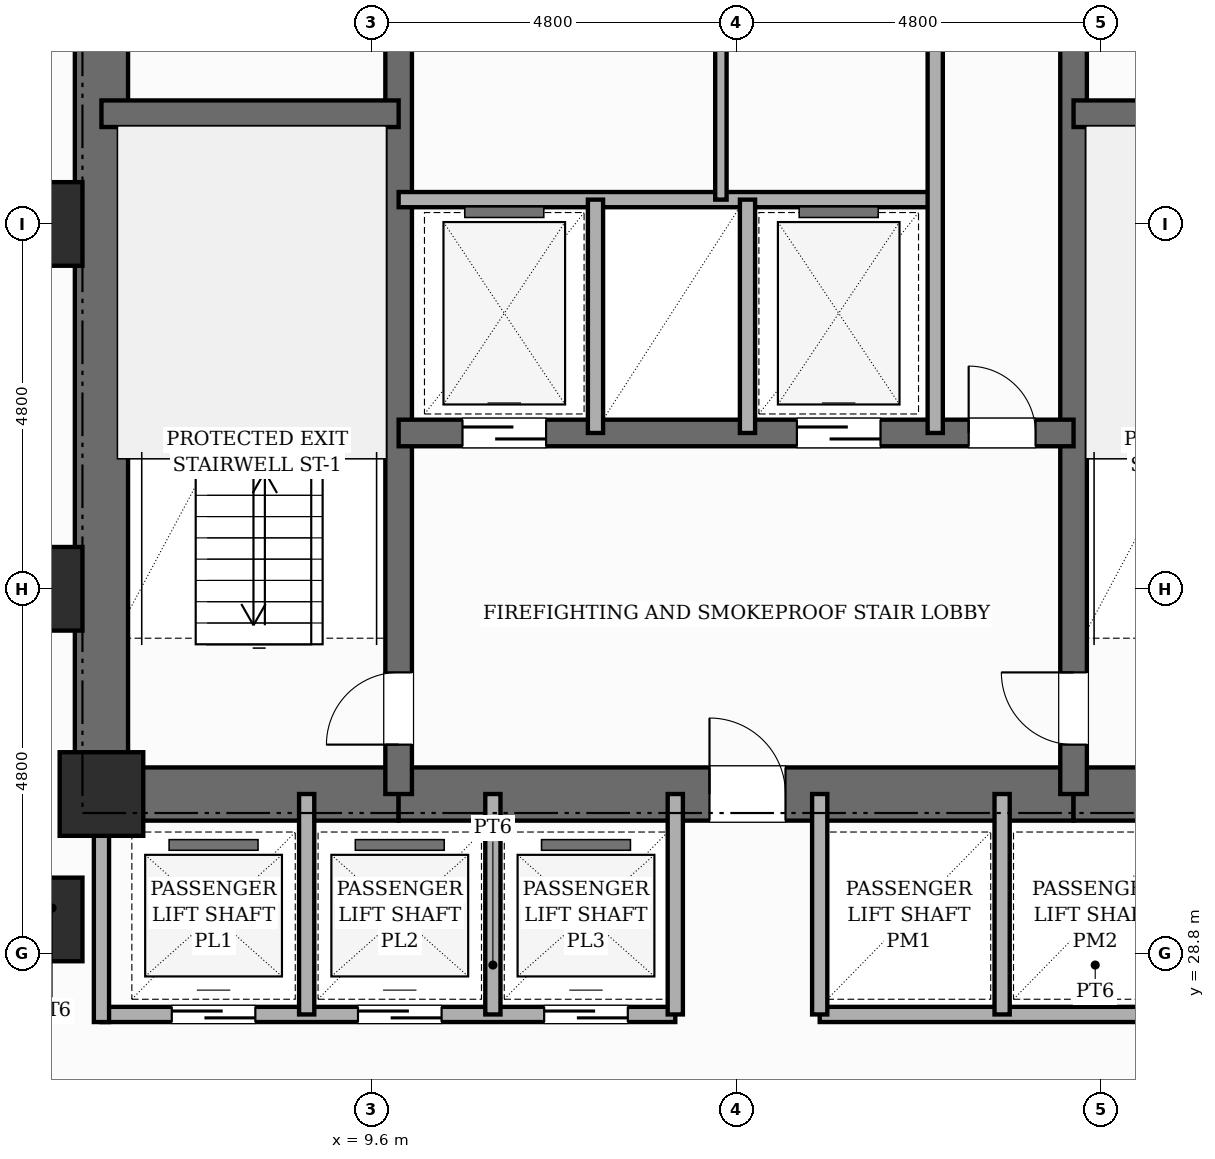
"""IFC4 building model, lengths in metres.
Left out: names, types, materials, properties, quantities, classifications, styles, units other than length and angle.
Written with IfcOpenShell. Run it as: python <this file> out.ifc"""

import sys

from ifc_helpers import new_model, si_unit, direction, frame, frame_2d, origin, origin_2d, place, context, subcontext, project, spatial, rectangle, extrude, element, fill, save


model = new_model("IFC4")
c1 = context("Model", 3, precision=1e-05, world=origin(), true_north=direction((0.0, 1.0)))
c2 = subcontext(c1, "Body", "Model", "MODEL_VIEW")
j1 = project(units=[si_unit("LENGTHUNIT", "METRE"), si_unit("PLANEANGLEUNIT", "RADIAN")], contexts=[c1])
p1 = place(None, origin())
s1 = spatial("IfcSite", under=j1, at=p1, CompositionType="ELEMENT")
p2 = place(p1, origin())
s2 = spatial("IfcBuilding", under=s1, at=p2, CompositionType="ELEMENT")
p3 = place(p2, frame((0.0, 0.0, 35.8)))
s3 = spatial("IfcBuildingStorey", under=s2, at=p3, CompositionType="ELEMENT", Elevation=35.8)
p4 = place(p3, frame((6.05, 30.55, 0.0), z_axis=(0.0, 0.0, 1.0), x_axis=(0.0, 1.0, 0.0)))
e1 = element("IfcWall", 1, at=p4, inside=s3, PredefinedType="SHEAR", context=c2, shape_type="SweptSolid", body=[
    extrude(rectangle(XDim=15.6, YDim=0.7, at=frame_2d((7.8, 0.0))), origin(), (0.0, 0.0, 1.0), 3.6),
])
p5 = place(p3, frame((6.05, 30.9, 0.0), z_axis=(0.0, 0.0, 1.0), x_axis=(1.0, 0.0, 0.0)))
e2 = element("IfcWall", 2, at=p5, inside=s3, PredefinedType="SHEAR", context=c2, shape_type="SweptSolid", body=[
    extrude(rectangle(XDim=3.91, YDim=0.7, at=frame_2d((1.955, 0.0))), origin(), (0.0, 0.0, 1.0), 3.6),
])
p6 = place(p3, frame((9.96, 30.9, 0.0), z_axis=(0.0, 0.0, 1.0), x_axis=(1.0, 0.0, 0.0)))
e3 = element("IfcWall", 3, at=p6, inside=s3, PredefinedType="SHEAR", context=c2, shape_type="SweptSolid", body=[
    extrude(rectangle(XDim=8.88, YDim=0.7, at=frame_2d((4.44, 0.0))), origin(), (0.0, 0.0, 1.0), 3.6),
])
p7 = place(p6, frame((4.09, 0.0, 0.0)))
e4 = element("IfcOpeningElement", 4, at=p7, cuts=e3, PredefinedType="OPENING", context=c2, shape_type="SweptSolid", body=[
    extrude(rectangle(XDim=1.0, YDim=2.15, at=frame_2d((0.5, 1.075))), frame((0.0, 0.36, 0.0), z_axis=(0.0, -1.0, 0.0), x_axis=(1.0, 0.0, 0.0)), (0.0, 0.0, 1.0), 0.72),
])
p8 = place(p3, frame((18.84, 30.9, 0.0), z_axis=(0.0, 0.0, 1.0), x_axis=(1.0, 0.0, 0.0)))
e5 = element("IfcWall", 5, at=p8, inside=s3, PredefinedType="SHEAR", context=c2, shape_type="SweptSolid", body=[
    extrude(rectangle(XDim=3.91, YDim=0.7, at=frame_2d((1.955, 0.0))), origin(), (0.0, 0.0, 1.0), 3.6),
])
p9 = place(p3, frame((9.96, 30.9, 0.0), z_axis=(0.0, 0.0, 1.0), x_axis=(0.0, 1.0, 0.0)))
e6 = element("IfcWall", 6, at=p9, inside=s3, PredefinedType="SHEAR", context=c2, shape_type="SweptSolid", body=[
    extrude(rectangle(XDim=14.9, YDim=0.35, at=frame_2d((7.45, 0.0))), origin(), (0.0, 0.0, 1.0), 3.6),
])
p10 = place(p9, frame((0.65, 0.0, 0.0)))
e7 = element("IfcOpeningElement", 7, at=p10, cuts=e6, PredefinedType="OPENING", context=c2, shape_type="SweptSolid", body=[
    extrude(rectangle(XDim=0.95, YDim=2.1, at=frame_2d((0.475, 1.05))), frame((0.0, 0.185, 0.0), z_axis=(0.0, -1.0, 0.0), x_axis=(1.0, 0.0, 0.0)), (0.0, 0.0, 1.0), 0.37),
])
p11 = place(p9, frame((10.45, 0.0, 0.0)))
e8 = element("IfcOpeningElement", 8, at=p11, cuts=e6, PredefinedType="OPENING", context=c2, shape_type="SweptSolid", body=[
    extrude(rectangle(XDim=1.0, YDim=2.15, at=frame_2d((0.5, 1.075))), frame((0.0, 0.185, 0.0), z_axis=(0.0, -1.0, 0.0), x_axis=(1.0, 0.0, 0.0)), (0.0, 0.0, 1.0), 0.37),
])
p12 = place(p3, frame((18.84, 30.9, 0.0), z_axis=(0.0, 0.0, 1.0), x_axis=(0.0, 1.0, 0.0)))
e9 = element("IfcWall", 9, at=p12, inside=s3, PredefinedType="SHEAR", context=c2, shape_type="SweptSolid", body=[
    extrude(rectangle(XDim=14.9, YDim=0.35, at=frame_2d((7.45, 0.0))), origin(), (0.0, 0.0, 1.0), 3.6),
])
p13 = place(p12, frame((0.65, 0.0, 0.0)))
e10 = element("IfcOpeningElement", 10, at=p13, cuts=e9, PredefinedType="OPENING", context=c2, shape_type="SweptSolid", body=[
    extrude(rectangle(XDim=0.95, YDim=2.1, at=frame_2d((0.475, 1.05))), frame((0.0, 0.185, 0.0), z_axis=(0.0, -1.0, 0.0), x_axis=(1.0, 0.0, 0.0)), (0.0, 0.0, 1.0), 0.37),
])
p14 = place(p12, frame((10.45, 0.0, 0.0)))
e11 = element("IfcOpeningElement", 11, at=p14, cuts=e9, PredefinedType="OPENING", context=c2, shape_type="SweptSolid", body=[
    extrude(rectangle(XDim=1.0, YDim=2.15, at=frame_2d((0.5, 1.075))), frame((0.0, 0.185, 0.0), z_axis=(0.0, -1.0, 0.0), x_axis=(1.0, 0.0, 0.0)), (0.0, 0.0, 1.0), 0.37),
])
for number, where, z_axis, x_axis in (
    (12, (6.05, 39.85, 0.0), (0.0, 0.0, 1.0), (1.0, 0.0, 0.0)),
    (13, (18.84, 39.85, 0.0), (0.0, 0.0, 1.0), (1.0, 0.0, 0.0)),
):
    element("IfcWall", number, at=place(p3, frame(where, z_axis=z_axis, x_axis=x_axis)), inside=s3, PredefinedType="SHEAR", context=c2, shape_type="SweptSolid", body=[
        extrude(rectangle(XDim=3.91, YDim=0.35, at=frame_2d((1.955, 0.0))), origin(), (0.0, 0.0, 1.0), 3.6),
    ])
p15 = place(p3, frame((9.96, 35.65, 0.0), z_axis=(0.0, 0.0, 1.0), x_axis=(1.0, 0.0, 0.0)))
e14 = element("IfcWall", 14, at=p15, inside=s3, PredefinedType="SHEAR", context=c2, shape_type="SweptSolid", body=[
    extrude(rectangle(XDim=8.88, YDim=0.35, at=frame_2d((4.44, 0.0))), origin(), (0.0, 0.0, 1.0), 3.6),
])
p16 = place(p15, frame((0.84, 0.0, 0.0)))
e15 = element("IfcOpeningElement", 15, at=p16, cuts=e14, PredefinedType="OPENING", context=c2, shape_type="SweptSolid", body=[
    extrude(rectangle(XDim=1.1, YDim=2.15, at=frame_2d((0.55, 1.075))), frame((0.0, 0.185, 0.0), z_axis=(0.0, -1.0, 0.0), x_axis=(1.0, 0.0, 0.0)), (0.0, 0.0, 1.0), 0.37),
])
p17 = place(p15, frame((5.24, 0.0, 0.0)))
e16 = element("IfcOpeningElement", 16, at=p17, cuts=e14, PredefinedType="OPENING", context=c2, shape_type="SweptSolid", body=[
    extrude(rectangle(XDim=1.1, YDim=2.15, at=frame_2d((0.55, 1.075))), frame((0.0, 0.185, 0.0), z_axis=(0.0, -1.0, 0.0), x_axis=(1.0, 0.0, 0.0)), (0.0, 0.0, 1.0), 0.37),
])
p18 = place(p15, frame((7.5, 0.0, 0.0)))
e17 = element("IfcOpeningElement", 17, at=p18, cuts=e14, PredefinedType="OPENING", context=c2, shape_type="SweptSolid", body=[
    extrude(rectangle(XDim=0.88, YDim=2.1, at=frame_2d((0.44, 1.05))), frame((0.0, 0.185, 0.0), z_axis=(0.0, -1.0, 0.0), x_axis=(1.0, 0.0, 0.0)), (0.0, 0.0, 1.0), 0.37),
])
for number, where, z_axis, x_axis in (
    (18, (5.25, 29.25, 0.0), (0.0, 0.0, 1.0), (1.0, 0.0, 0.0)),
    (19, (5.25, 33.6, 0.0), (0.0, 0.0, 1.0), (1.0, 0.0, 0.0)),
    (20, (5.25, 38.4, 0.0), (0.0, 0.0, 1.0), (1.0, 0.0, 0.0)),
    (21, (6.05, 30.9, 0.0), (0.0, 0.0, 1.0), (1.0, 0.0, 0.0)),
):
    element("IfcColumn", number, at=place(p3, frame(where, z_axis=z_axis, x_axis=x_axis)), inside=s3, PredefinedType="COLUMN", context=c2, shape_type="SweptSolid", body=[
        extrude(rectangle(XDim=1.1, YDim=1.1, at=origin_2d()), origin(), (0.0, 0.0, 1.0), 3.6),
    ])
p19 = place(p3, frame((9.96, 38.72, 0.0), z_axis=(0.0, 0.0, 1.0), x_axis=(1.0, 0.0, 0.0)))
e22 = element("IfcWall", 22, at=p19, inside=s3, PredefinedType="POLYGONAL", context=c2, shape_type="SweptSolid", body=[
    extrude(rectangle(XDim=7.06, YDim=0.2, at=frame_2d((3.53, 0.0))), origin(), (0.0, 0.0, 1.0), 3.35),
])
for number, where, z_axis, x_axis in (
    (23, (12.55, 35.65, 0.0), (0.0, 0.0, 1.0), (0.0, 1.0, 0.0)),
    (24, (14.55, 35.65, 0.0), (0.0, 0.0, 1.0), (0.0, 1.0, 0.0)),
):
    element("IfcWall", number, at=place(p3, frame(where, z_axis=z_axis, x_axis=x_axis)), inside=s3, PredefinedType="POLYGONAL", context=c2, shape_type="SweptSolid", body=[
        extrude(rectangle(XDim=3.07, YDim=0.2, at=frame_2d((1.535, 0.0))), origin(), (0.0, 0.0, 1.0), 3.35),
    ])
p20 = place(p3, frame((17.02, 35.65, 0.0), z_axis=(0.0, 0.0, 1.0), x_axis=(0.0, 1.0, 0.0)))
e25 = element("IfcWall", 25, at=p20, inside=s3, PredefinedType="POLYGONAL", context=c2, shape_type="SweptSolid", body=[
    extrude(rectangle(XDim=5.15, YDim=0.2, at=frame_2d((2.575, 0.0))), origin(), (0.0, 0.0, 1.0), 3.35),
])
p21 = place(p3, frame((14.2, 38.72, 0.0), z_axis=(0.0, 0.0, 1.0), x_axis=(0.0, 1.0, 0.0)))
e26 = element("IfcWall", 26, at=p21, inside=s3, PredefinedType="PARTITIONING", context=c2, shape_type="SweptSolid", body=[
    extrude(rectangle(XDim=2.08, YDim=0.15, at=frame_2d((1.04, 0.0))), origin(), (0.0, 0.0, 1.0), 3.35),
])
p22 = place(p3, frame((6.05, 28.0, 0.0), z_axis=(0.0, 0.0, 1.0), x_axis=(1.0, 0.0, 0.0)))
e27 = element("IfcWall", 27, at=p22, inside=s3, PredefinedType="POLYGONAL", context=c2, shape_type="SweptSolid", body=[
    extrude(rectangle(XDim=7.55, YDim=0.2, at=frame_2d((3.775, 0.0))), origin(), (0.0, 0.0, 1.0), 3.35),
])
p23 = place(p22, frame((0.925, 0.0, 0.0)))
e28 = element("IfcOpeningElement", 28, at=p23, cuts=e27, PredefinedType="OPENING", context=c2, shape_type="SweptSolid", body=[
    extrude(rectangle(XDim=1.1, YDim=2.15, at=frame_2d((0.55, 1.075))), frame((0.0, 0.11, 0.0), z_axis=(0.0, -1.0, 0.0), x_axis=(1.0, 0.0, 0.0)), (0.0, 0.0, 1.0), 0.22),
])
p24 = place(p22, frame((3.375, 0.0, 0.0)))
e29 = element("IfcOpeningElement", 29, at=p24, cuts=e27, PredefinedType="OPENING", context=c2, shape_type="SweptSolid", body=[
    extrude(rectangle(XDim=1.1, YDim=2.15, at=frame_2d((0.55, 1.075))), frame((0.0, 0.11, 0.0), z_axis=(0.0, -1.0, 0.0), x_axis=(1.0, 0.0, 0.0)), (0.0, 0.0, 1.0), 0.22),
])
p25 = place(p22, frame((5.825, 0.0, 0.0)))
e30 = element("IfcOpeningElement", 30, at=p25, cuts=e27, PredefinedType="OPENING", context=c2, shape_type="SweptSolid", body=[
    extrude(rectangle(XDim=1.1, YDim=2.15, at=frame_2d((0.55, 1.075))), frame((0.0, 0.11, 0.0), z_axis=(0.0, -1.0, 0.0), x_axis=(1.0, 0.0, 0.0)), (0.0, 0.0, 1.0), 0.22),
])
p26 = place(p3, frame((15.5, 28.0, 0.0), z_axis=(0.0, 0.0, 1.0), x_axis=(1.0, 0.0, 0.0)))
e31 = element("IfcWall", 31, at=p26, inside=s3, PredefinedType="POLYGONAL", context=c2, shape_type="SweptSolid", body=[
    extrude(rectangle(XDim=7.25, YDim=0.2, at=frame_2d((3.625, 0.0))), origin(), (0.0, 0.0, 1.0), 3.35),
])
p27 = place(p3, frame((6.05, 27.9, 0.0), z_axis=(0.0, 0.0, 1.0), x_axis=(0.0, 1.0, 0.0)))
e32 = element("IfcWall", 32, at=p27, inside=s3, PredefinedType="POLYGONAL", context=c2, shape_type="SweptSolid", body=[
    extrude(rectangle(XDim=3.0, YDim=0.2, at=frame_2d((1.5, 0.0))), origin(), (0.0, 0.0, 1.0), 3.35),
])
for number, where, z_axis, x_axis in (
    (33, (13.6, 28.0, 0.0), (0.0, 0.0, 1.0), (0.0, 1.0, 0.0)),
    (34, (15.5, 28.0, 0.0), (0.0, 0.0, 1.0), (0.0, 1.0, 0.0)),
    (35, (8.75, 28.0, 0.0), (0.0, 0.0, 1.0), (0.0, 1.0, 0.0)),
    (36, (11.2, 28.0, 0.0), (0.0, 0.0, 1.0), (0.0, 1.0, 0.0)),
    (37, (17.9, 28.0, 0.0), (0.0, 0.0, 1.0), (0.0, 1.0, 0.0)),
):
    element("IfcWall", number, at=place(p3, frame(where, z_axis=z_axis, x_axis=x_axis)), inside=s3, PredefinedType="POLYGONAL", context=c2, shape_type="SweptSolid", body=[
        extrude(rectangle(XDim=2.9, YDim=0.2, at=frame_2d((1.45, 0.0))), origin(), (0.0, 0.0, 1.0), 3.35),
    ])
p28 = place(p10, origin())
e38 = element("IfcDoor", 38, at=p28, inside=s3, OperationType="SINGLE_SWING_LEFT", PredefinedType="DOOR", context=c2, shape_type="SweptSolid", body=[
    extrude(rectangle(XDim=0.95, YDim=2.1, at=frame_2d((0.475, 1.05))), frame((0.0, 0.025, 0.0), z_axis=(0.0, -1.0, 0.0), x_axis=(1.0, 0.0, 0.0)), (0.0, 0.0, 1.0), 0.05),
])
fill(e7, e38)
p29 = place(p13, origin())
e39 = element("IfcDoor", 39, at=p29, inside=s3, OperationType="SINGLE_SWING_RIGHT", PredefinedType="DOOR", context=c2, shape_type="SweptSolid", body=[
    extrude(rectangle(XDim=0.95, YDim=2.1, at=frame_2d((0.475, 1.05))), frame((0.0, 0.025, 0.0), z_axis=(0.0, -1.0, 0.0), x_axis=(1.0, 0.0, 0.0)), (0.0, 0.0, 1.0), 0.05),
])
fill(e10, e39)
p30 = place(p7, origin())
e40 = element("IfcDoor", 40, at=p30, inside=s3, OperationType="SINGLE_SWING_LEFT", PredefinedType="DOOR", context=c2, shape_type="SweptSolid", body=[
    extrude(rectangle(XDim=1.0, YDim=2.15, at=frame_2d((0.5, 1.075))), frame((0.0, 0.025, 0.0), z_axis=(0.0, -1.0, 0.0), x_axis=(1.0, 0.0, 0.0)), (0.0, 0.0, 1.0), 0.05),
])
fill(e4, e40)
p31 = place(p16, origin())
e41 = element("IfcDoor", 41, at=p31, inside=s3, OperationType="SLIDING_TO_LEFT", PredefinedType="DOOR", context=c2, shape_type="SweptSolid", body=[
    extrude(rectangle(XDim=1.1, YDim=2.15, at=frame_2d((0.55, 1.075))), frame((0.0, 0.025, 0.0), z_axis=(0.0, -1.0, 0.0), x_axis=(1.0, 0.0, 0.0)), (0.0, 0.0, 1.0), 0.05),
])
fill(e15, e41)
p32 = place(p17, origin())
e42 = element("IfcDoor", 42, at=p32, inside=s3, OperationType="SLIDING_TO_RIGHT", PredefinedType="DOOR", context=c2, shape_type="SweptSolid", body=[
    extrude(rectangle(XDim=1.1, YDim=2.15, at=frame_2d((0.55, 1.075))), frame((0.0, 0.025, 0.0), z_axis=(0.0, -1.0, 0.0), x_axis=(1.0, 0.0, 0.0)), (0.0, 0.0, 1.0), 0.05),
])
fill(e16, e42)
p33 = place(p18, origin())
e43 = element("IfcDoor", 43, at=p33, inside=s3, OperationType="SINGLE_SWING_LEFT", PredefinedType="DOOR", context=c2, shape_type="SweptSolid", body=[
    extrude(rectangle(XDim=0.88, YDim=2.1, at=frame_2d((0.44, 1.05))), frame((0.0, 0.025, 0.0), z_axis=(0.0, -1.0, 0.0), x_axis=(1.0, 0.0, 0.0)), (0.0, 0.0, 1.0), 0.05),
])
fill(e17, e43)
p34 = place(p23, origin())
e44 = element("IfcDoor", 44, at=p34, inside=s3, OperationType="SLIDING_TO_LEFT", PredefinedType="DOOR", context=c2, shape_type="SweptSolid", body=[
    extrude(rectangle(XDim=1.1, YDim=2.15, at=frame_2d((0.55, 1.075))), frame((0.0, 0.025, 0.0), z_axis=(0.0, -1.0, 0.0), x_axis=(1.0, 0.0, 0.0)), (0.0, 0.0, 1.0), 0.05),
])
fill(e28, e44)
p35 = place(p24, origin())
e45 = element("IfcDoor", 45, at=p35, inside=s3, OperationType="SLIDING_TO_RIGHT", PredefinedType="DOOR", context=c2, shape_type="SweptSolid", body=[
    extrude(rectangle(XDim=1.1, YDim=2.15, at=frame_2d((0.55, 1.075))), frame((0.0, 0.025, 0.0), z_axis=(0.0, -1.0, 0.0), x_axis=(1.0, 0.0, 0.0)), (0.0, 0.0, 1.0), 0.05),
])
fill(e29, e45)
p36 = place(p25, origin())
e46 = element("IfcDoor", 46, at=p36, inside=s3, OperationType="SLIDING_TO_LEFT", PredefinedType="DOOR", context=c2, shape_type="SweptSolid", body=[
    extrude(rectangle(XDim=1.1, YDim=2.15, at=frame_2d((0.55, 1.075))), frame((0.0, 0.025, 0.0), z_axis=(0.0, -1.0, 0.0), x_axis=(1.0, 0.0, 0.0)), (0.0, 0.0, 1.0), 0.05),
])
fill(e30, e46)
save(model, sys.argv[1])
